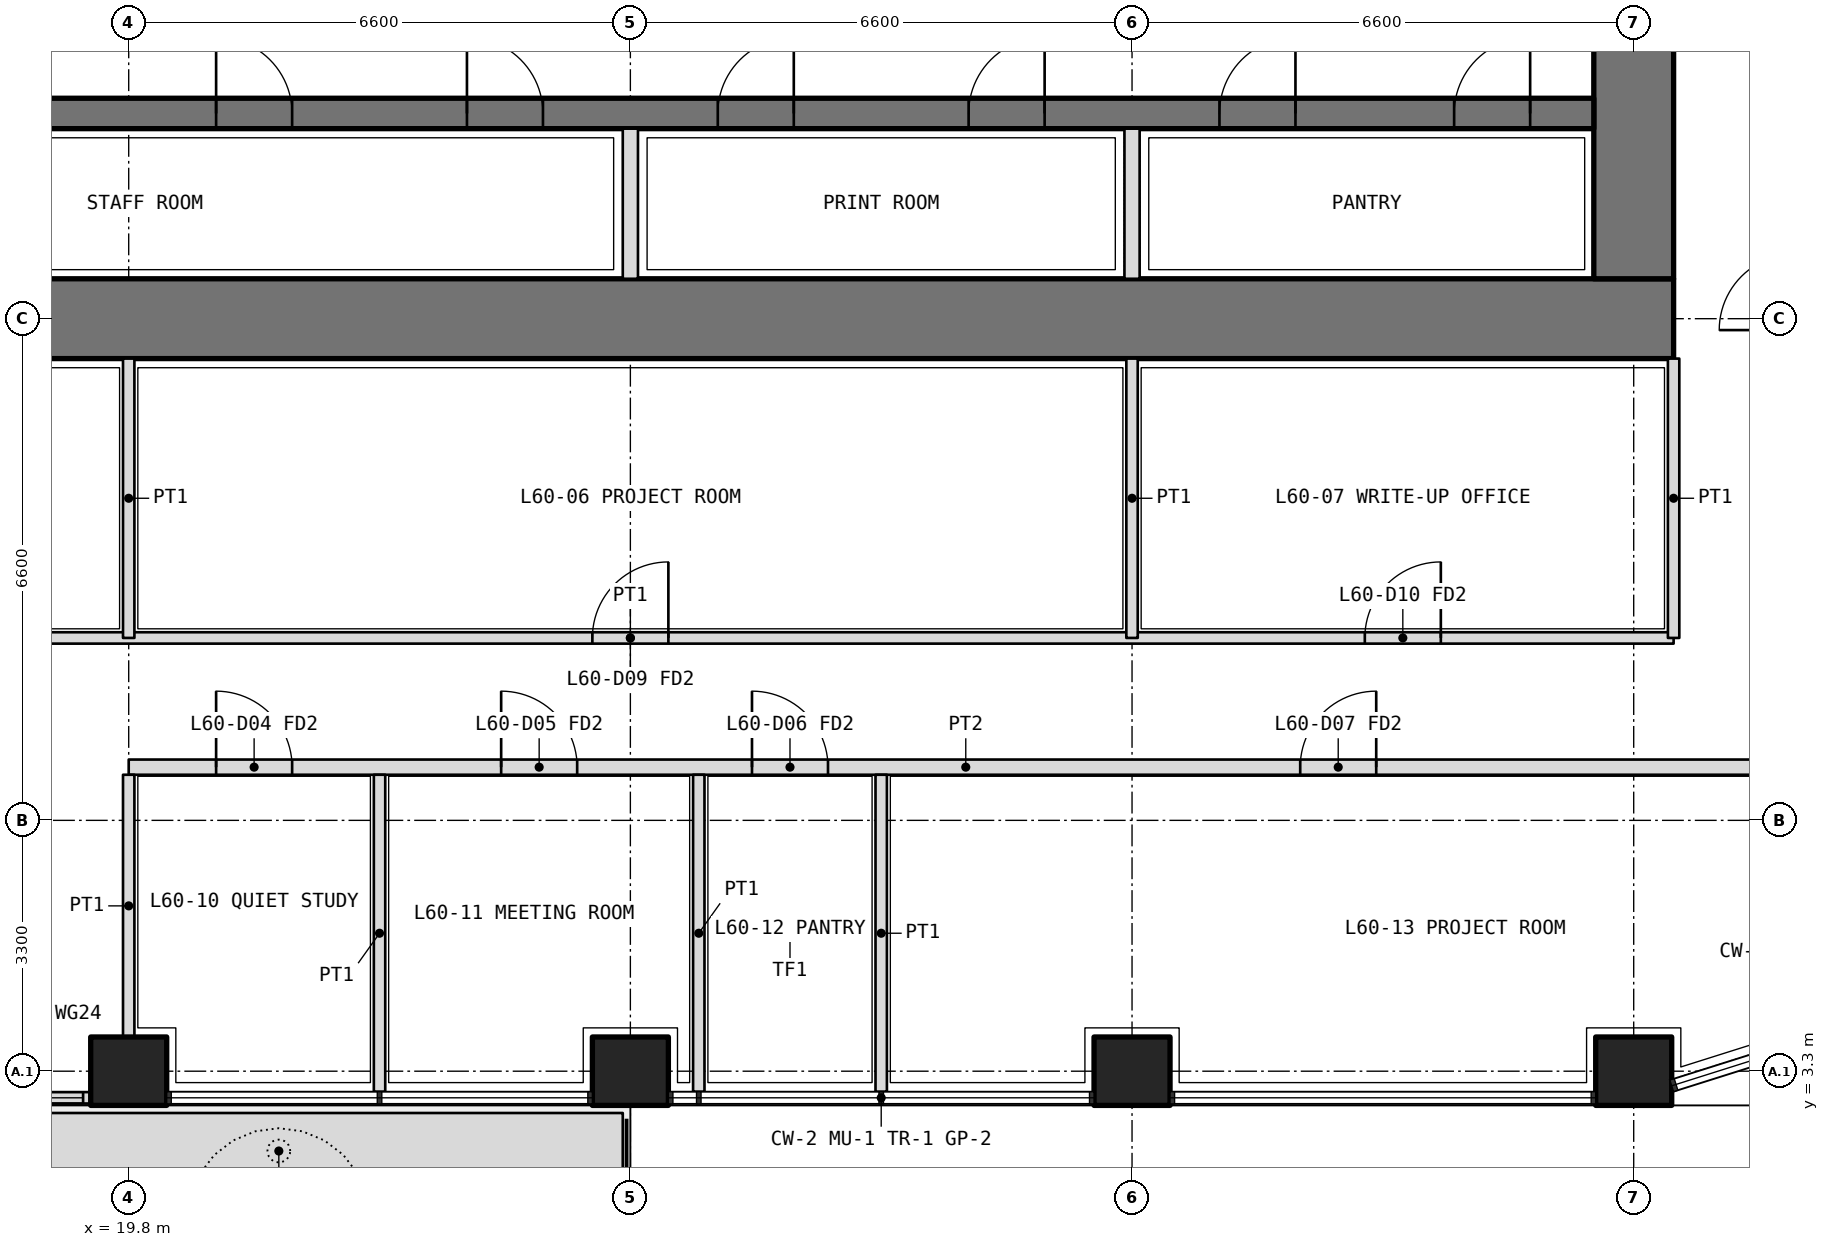
"""IFC4 building model, lengths in metres.
Left out: names, types, materials, properties, quantities, classifications, styles, units other than length and angle.
Written with IfcOpenShell. Run it as: python <this file> out.ifc"""

import sys

from ifc_helpers import new_model, si_unit, direction, frame, frame_2d, origin, origin_2d, place, context, subcontext, project, spatial, polyline, rectangle, outline, extrude, element, fill, save


model = new_model("IFC4")
c1 = context("Model", 3, precision=1e-05, world=origin(), true_north=direction((0.0, 1.0)))
c2 = subcontext(c1, "Body", "Model", "MODEL_VIEW")
j1 = project(units=[si_unit("LENGTHUNIT", "METRE"), si_unit("PLANEANGLEUNIT", "RADIAN")], contexts=[c1])
p1 = place(None, origin())
s1 = spatial("IfcSite", under=j1, at=p1, CompositionType="ELEMENT")
p2 = place(p1, origin())
s2 = spatial("IfcBuilding", under=s1, at=p2, CompositionType="ELEMENT")
p3 = place(p2, frame((0.0, 0.0, 262.8)))
s3 = spatial("IfcBuildingStorey", under=s2, at=p3, CompositionType="ELEMENT", Elevation=262.8)
for number, where, z_axis, x_axis in (
    (1, (19.8, 3.3, 0.0), (0.0, 0.0, 1.0), (1.0, 0.0, 0.0)),
    (2, (26.4, 3.3, 0.0), (0.0, 0.0, 1.0), (1.0, 0.0, 0.0)),
    (3, (33.0, 3.3, 0.0), (0.0, 0.0, 1.0), (1.0, 0.0, 0.0)),
    (4, (39.6, 3.3, 0.0), (0.0, 0.0, 1.0), (1.0, 0.0, 0.0)),
):
    element("IfcColumn", number, at=place(p3, frame(where, z_axis=z_axis, x_axis=x_axis)), inside=s3, PredefinedType="COLUMN", context=c2, shape_type="SweptSolid", body=[
        extrude(rectangle(XDim=1.0, YDim=0.9, at=origin_2d()), origin(), (0.0, 0.0, 1.0), 4.2),
    ])
p4 = place(p3, origin())
e5 = element("IfcWall", 5, at=p4, inside=s3, PredefinedType="USERDEFINED", context=c2, shape_type="SweptSolid", body=[
    extrude(outline(polyline([(17.25, 1.75), (26.3, 1.75), (26.3, 2.75), (17.25, 2.75), (17.25, 1.75)]), holes=[polyline([(17.4, 1.9), (26.15, 1.9), (26.15, 2.6), (17.4, 2.6), (17.4, 1.9)])]), origin(), (0.0, 0.0, 1.0), 1.05),
])
p5 = place(p3, frame((13.7, 2.95, 0.0), z_axis=(0.0, 0.0, 1.0), x_axis=(1.0, 0.0, 0.0)))
e6 = element("IfcWall", 6, at=p5, inside=s3, PredefinedType="SOLIDWALL", context=c2, shape_type="SweptSolid", body=[
    extrude(rectangle(XDim=5.6, YDim=0.15, at=frame_2d((2.8, 0.0))), origin(), (0.0, 0.0, 1.0), 2.7),
])
p6 = place(p5, frame((3.05, 0.0, 0.0)))
e7 = element("IfcOpeningElement", 7, at=p6, cuts=e6, PredefinedType="OPENING", context=c2, shape_type="SweptSolid", body=[
    extrude(rectangle(XDim=1.0, YDim=2.4, at=frame_2d((0.5, 1.2))), frame((0.0, 0.085, 0.0), z_axis=(0.0, -1.0, 0.0), x_axis=(1.0, 0.0, 0.0)), (0.0, 0.0, 1.0), 0.17),
])
p7 = place(p5, frame((0.1, 0.0, 0.1)))
e8 = element("IfcOpeningElement", 8, at=p7, cuts=e6, PredefinedType="OPENING", context=c2, shape_type="SweptSolid", body=[
    extrude(rectangle(XDim=2.45, YDim=2.3, at=frame_2d((1.225, 1.15))), frame((0.0, 0.085, 0.0), z_axis=(0.0, -1.0, 0.0), x_axis=(1.0, 0.0, 0.0)), (0.0, 0.0, 1.0), 0.17),
])
p8 = place(p5, frame((4.15, 0.0, 0.1)))
e9 = element("IfcOpeningElement", 9, at=p8, cuts=e6, PredefinedType="OPENING", context=c2, shape_type="SweptSolid", body=[
    extrude(rectangle(XDim=1.35, YDim=2.3, at=frame_2d((0.675, 1.15))), frame((0.0, 0.085, 0.0), z_axis=(0.0, -1.0, 0.0), x_axis=(1.0, 0.0, 0.0)), (0.0, 0.0, 1.0), 0.17),
])
p9 = place(p3, frame((12.675, 13.2, 0.0), z_axis=(0.0, 0.0, 1.0), x_axis=(1.0, 0.0, 0.0)))
e10 = element("IfcWall", 10, at=p9, inside=s3, PredefinedType="SHEAR", context=c2, shape_type="SweptSolid", body=[
    extrude(rectangle(XDim=27.45, YDim=1.05, at=frame_2d((13.725, 0.0))), origin(), (0.0, 0.0, 1.0), 4.2),
])
p10 = place(p3, frame((39.6, 13.725, 0.0), z_axis=(0.0, 0.0, 1.0), x_axis=(0.0, 1.0, 0.0)))
e11 = element("IfcWall", 11, at=p10, inside=s3, PredefinedType="SHEAR", context=c2, shape_type="SweptSolid", body=[
    extrude(rectangle(XDim=18.75, YDim=1.05, at=frame_2d((9.375, 0.0))), origin(), (0.0, 0.0, 1.0), 4.2),
])
p11 = place(p10, frame((3.025, 0.0, 0.0)))
e12 = element("IfcOpeningElement", 12, at=p11, cuts=e11, PredefinedType="OPENING", context=c2, shape_type="SweptSolid", body=[
    extrude(rectangle(XDim=1.6, YDim=2.1, at=frame_2d((0.8, 1.05))), frame((0.0, 0.535, 0.0), z_axis=(0.0, -1.0, 0.0), x_axis=(1.0, 0.0, 0.0)), (0.0, 0.0, 1.0), 1.07),
])
p12 = place(p10, frame((13.825, 0.0, 0.0)))
e13 = element("IfcOpeningElement", 13, at=p12, cuts=e11, PredefinedType="OPENING", context=c2, shape_type="SweptSolid", body=[
    extrude(rectangle(XDim=1.6, YDim=2.1, at=frame_2d((0.8, 1.05))), frame((0.0, 0.535, 0.0), z_axis=(0.0, -1.0, 0.0), x_axis=(1.0, 0.0, 0.0)), (0.0, 0.0, 1.0), 1.07),
])
p13 = place(p3, frame((13.725, 15.9, 0.0), z_axis=(0.0, 0.0, 1.0), x_axis=(1.0, 0.0, 0.0)))
e14 = element("IfcWall", 14, at=p13, inside=s3, PredefinedType="SHEAR", context=c2, shape_type="SweptSolid", body=[
    extrude(rectangle(XDim=25.35, YDim=0.4, at=frame_2d((12.675, 0.0))), origin(), (0.0, 0.0, 1.0), 4.2),
])
p14 = place(p13, frame((0.837, 0.0, 0.0)))
e15 = element("IfcOpeningElement", 15, at=p14, cuts=e14, PredefinedType="OPENING", context=c2, shape_type="SweptSolid", body=[
    extrude(rectangle(XDim=1.0, YDim=2.1, at=frame_2d((0.5, 1.05))), frame((0.0, 0.21, 0.0), z_axis=(0.0, -1.0, 0.0), x_axis=(1.0, 0.0, 0.0)), (0.0, 0.0, 1.0), 0.42),
])
p15 = place(p13, frame((3.925, 0.0, 0.0)))
e16 = element("IfcOpeningElement", 16, at=p15, cuts=e14, PredefinedType="OPENING", context=c2, shape_type="SweptSolid", body=[
    extrude(rectangle(XDim=1.0, YDim=2.1, at=frame_2d((0.5, 1.05))), frame((0.0, 0.21, 0.0), z_axis=(0.0, -1.0, 0.0), x_axis=(1.0, 0.0, 0.0)), (0.0, 0.0, 1.0), 0.42),
])
p16 = place(p13, frame((7.225, 0.0, 0.0)))
e17 = element("IfcOpeningElement", 17, at=p16, cuts=e14, PredefinedType="OPENING", context=c2, shape_type="SweptSolid", body=[
    extrude(rectangle(XDim=1.0, YDim=2.1, at=frame_2d((0.5, 1.05))), frame((0.0, 0.21, 0.0), z_axis=(0.0, -1.0, 0.0), x_axis=(1.0, 0.0, 0.0)), (0.0, 0.0, 1.0), 0.42),
])
p17 = place(p13, frame((10.525, 0.0, 0.0)))
e18 = element("IfcOpeningElement", 18, at=p17, cuts=e14, PredefinedType="OPENING", context=c2, shape_type="SweptSolid", body=[
    extrude(rectangle(XDim=1.0, YDim=2.1, at=frame_2d((0.5, 1.05))), frame((0.0, 0.21, 0.0), z_axis=(0.0, -1.0, 0.0), x_axis=(1.0, 0.0, 0.0)), (0.0, 0.0, 1.0), 0.42),
])
p18 = place(p13, frame((13.825, 0.0, 0.0)))
e19 = element("IfcOpeningElement", 19, at=p18, cuts=e14, PredefinedType="OPENING", context=c2, shape_type="SweptSolid", body=[
    extrude(rectangle(XDim=1.0, YDim=2.1, at=frame_2d((0.5, 1.05))), frame((0.0, 0.21, 0.0), z_axis=(0.0, -1.0, 0.0), x_axis=(1.0, 0.0, 0.0)), (0.0, 0.0, 1.0), 0.42),
])
p19 = place(p13, frame((17.125, 0.0, 0.0)))
e20 = element("IfcOpeningElement", 20, at=p19, cuts=e14, PredefinedType="OPENING", context=c2, shape_type="SweptSolid", body=[
    extrude(rectangle(XDim=1.0, YDim=2.1, at=frame_2d((0.5, 1.05))), frame((0.0, 0.21, 0.0), z_axis=(0.0, -1.0, 0.0), x_axis=(1.0, 0.0, 0.0)), (0.0, 0.0, 1.0), 0.42),
])
p20 = place(p13, frame((20.425, 0.0, 0.0)))
e21 = element("IfcOpeningElement", 21, at=p20, cuts=e14, PredefinedType="OPENING", context=c2, shape_type="SweptSolid", body=[
    extrude(rectangle(XDim=1.0, YDim=2.1, at=frame_2d((0.5, 1.05))), frame((0.0, 0.21, 0.0), z_axis=(0.0, -1.0, 0.0), x_axis=(1.0, 0.0, 0.0)), (0.0, 0.0, 1.0), 0.42),
])
p21 = place(p13, frame((23.512, 0.0, 0.0)))
e22 = element("IfcOpeningElement", 22, at=p21, cuts=e14, PredefinedType="OPENING", context=c2, shape_type="SweptSolid", body=[
    extrude(rectangle(XDim=1.0, YDim=2.1, at=frame_2d((0.5, 1.05))), frame((0.0, 0.21, 0.0), z_axis=(0.0, -1.0, 0.0), x_axis=(1.0, 0.0, 0.0)), (0.0, 0.0, 1.0), 0.42),
])
for number, where, z_axis, x_axis in (
    (23, (26.4, 13.725, 0.0), (0.0, 0.0, 1.0), (0.0, 1.0, 0.0)),
    (24, (33.0, 13.725, 0.0), (0.0, 0.0, 1.0), (0.0, 1.0, 0.0)),
):
    element("IfcWall", number, at=place(p3, frame(where, z_axis=z_axis, x_axis=x_axis)), inside=s3, PredefinedType="PARTITIONING", context=c2, shape_type="SweptSolid", body=[
        extrude(rectangle(XDim=1.975, YDim=0.2, at=frame_2d((0.987, 0.0))), origin(), (0.0, 0.0, 1.0), 4.2),
    ])
p22 = place(p3, frame((12.675, 9.0, 0.0), z_axis=(0.0, 0.0, 1.0), x_axis=(1.0, 0.0, 0.0)))
e25 = element("IfcWall", 25, at=p22, inside=s3, PredefinedType="PARTITIONING", context=c2, shape_type="SweptSolid", body=[
    extrude(rectangle(XDim=27.45, YDim=0.15, at=frame_2d((13.725, 0.0))), origin(), (0.0, 0.0, 1.0), 3.0),
])
p23 = place(p22, frame((3.062, 0.0, 0.0)))
e26 = element("IfcOpeningElement", 26, at=p23, cuts=e25, PredefinedType="OPENING", context=c2, shape_type="SweptSolid", body=[
    extrude(rectangle(XDim=1.0, YDim=2.1, at=frame_2d((0.5, 1.05))), frame((0.0, 0.085, 0.0), z_axis=(0.0, -1.0, 0.0), x_axis=(1.0, 0.0, 0.0)), (0.0, 0.0, 1.0), 0.17),
])
p24 = place(p22, frame((13.225, 0.0, 0.0)))
e27 = element("IfcOpeningElement", 27, at=p24, cuts=e25, PredefinedType="OPENING", context=c2, shape_type="SweptSolid", body=[
    extrude(rectangle(XDim=1.0, YDim=2.1, at=frame_2d((0.5, 1.05))), frame((0.0, 0.085, 0.0), z_axis=(0.0, -1.0, 0.0), x_axis=(1.0, 0.0, 0.0)), (0.0, 0.0, 1.0), 0.17),
])
p25 = place(p22, frame((23.387, 0.0, 0.0)))
e28 = element("IfcOpeningElement", 28, at=p25, cuts=e25, PredefinedType="OPENING", context=c2, shape_type="SweptSolid", body=[
    extrude(rectangle(XDim=1.0, YDim=2.1, at=frame_2d((0.5, 1.05))), frame((0.0, 0.085, 0.0), z_axis=(0.0, -1.0, 0.0), x_axis=(1.0, 0.0, 0.0)), (0.0, 0.0, 1.0), 0.17),
])
for number, where, z_axis, x_axis in (
    (29, (40.125, 12.675, 0.0), (0.0, 0.0, 1.0), (0.0, -1.0, 0.0)),
    (30, (19.8, 12.675, 0.0), (0.0, 0.0, 1.0), (0.0, -1.0, 0.0)),
    (31, (33.0, 12.675, 0.0), (0.0, 0.0, 1.0), (0.0, -1.0, 0.0)),
):
    element("IfcWall", number, at=place(p3, frame(where, z_axis=z_axis, x_axis=x_axis)), inside=s3, PredefinedType="PARTITIONING", context=c2, shape_type="SweptSolid", body=[
        extrude(rectangle(XDim=3.675, YDim=0.15, at=frame_2d((1.837, 0.0))), origin(), (0.0, 0.0, 1.0), 3.0),
    ])
p26 = place(p3, frame((19.8, 7.3, 0.0), z_axis=(0.0, 0.0, 1.0), x_axis=(1.0, 0.0, 0.0)))
e32 = element("IfcWall", 32, at=p26, inside=s3, PredefinedType="PARTITIONING", context=c2, shape_type="SweptSolid", body=[
    extrude(rectangle(XDim=22.025, YDim=0.2, at=frame_2d((11.012, 0.0))), origin(), (0.0, 0.0, 1.0), 3.0),
])
p27 = place(p26, frame((1.15, 0.0, 0.0)))
e33 = element("IfcOpeningElement", 33, at=p27, cuts=e32, PredefinedType="OPENING", context=c2, shape_type="SweptSolid", body=[
    extrude(rectangle(XDim=1.0, YDim=2.1, at=frame_2d((0.5, 1.05))), frame((0.0, 0.11, 0.0), z_axis=(0.0, -1.0, 0.0), x_axis=(1.0, 0.0, 0.0)), (0.0, 0.0, 1.0), 0.22),
])
p28 = place(p26, frame((4.9, 0.0, 0.0)))
e34 = element("IfcOpeningElement", 34, at=p28, cuts=e32, PredefinedType="OPENING", context=c2, shape_type="SweptSolid", body=[
    extrude(rectangle(XDim=1.0, YDim=2.1, at=frame_2d((0.5, 1.05))), frame((0.0, 0.11, 0.0), z_axis=(0.0, -1.0, 0.0), x_axis=(1.0, 0.0, 0.0)), (0.0, 0.0, 1.0), 0.22),
])
p29 = place(p26, frame((8.2, 0.0, 0.0)))
e35 = element("IfcOpeningElement", 35, at=p29, cuts=e32, PredefinedType="OPENING", context=c2, shape_type="SweptSolid", body=[
    extrude(rectangle(XDim=1.0, YDim=2.1, at=frame_2d((0.5, 1.05))), frame((0.0, 0.11, 0.0), z_axis=(0.0, -1.0, 0.0), x_axis=(1.0, 0.0, 0.0)), (0.0, 0.0, 1.0), 0.22),
])
p30 = place(p26, frame((15.413, 0.0, 0.0)))
e36 = element("IfcOpeningElement", 36, at=p30, cuts=e32, PredefinedType="OPENING", context=c2, shape_type="SweptSolid", body=[
    extrude(rectangle(XDim=1.0, YDim=2.1, at=frame_2d((0.5, 1.05))), frame((0.0, 0.11, 0.0), z_axis=(0.0, -1.0, 0.0), x_axis=(1.0, 0.0, 0.0)), (0.0, 0.0, 1.0), 0.22),
])
for number, where, z_axis, x_axis in (
    (37, (27.3, 3.03, 0.0), (0.0, 0.0, 1.0), (0.0, 1.0, 0.0)),
    (38, (29.7, 3.03, 0.0), (0.0, 0.0, 1.0), (0.0, 1.0, 0.0)),
):
    element("IfcWall", number, at=place(p3, frame(where, z_axis=z_axis, x_axis=x_axis)), inside=s3, PredefinedType="PARTITIONING", context=c2, shape_type="SweptSolid", body=[
        extrude(rectangle(XDim=4.17, YDim=0.15, at=frame_2d((2.085, 0.0))), origin(), (0.0, 0.0, 1.0), 2.7),
    ])
p31 = place(p3, frame((19.8, 3.75, 0.0), z_axis=(0.0, 0.0, 1.0), x_axis=(0.0, 1.0, 0.0)))
e39 = element("IfcWall", 39, at=p31, inside=s3, PredefinedType="PARTITIONING", context=c2, shape_type="SweptSolid", body=[
    extrude(rectangle(XDim=3.45, YDim=0.15, at=frame_2d((1.725, 0.0))), origin(), (0.0, 0.0, 1.0), 3.0),
])
p32 = place(p3, frame((23.1, 3.03, 0.0), z_axis=(0.0, 0.0, 1.0), x_axis=(0.0, 1.0, 0.0)))
e40 = element("IfcWall", 40, at=p32, inside=s3, PredefinedType="PARTITIONING", context=c2, shape_type="SweptSolid", body=[
    extrude(rectangle(XDim=4.17, YDim=0.15, at=frame_2d((2.085, 0.0))), origin(), (0.0, 0.0, 1.0), 2.7),
])
p33 = place(p8, origin())
e41 = element("IfcWindow", 41, at=p33, inside=s3, PartitioningType="SINGLE_PANEL", PredefinedType="WINDOW", context=c2, shape_type="SweptSolid", body=[
    extrude(rectangle(XDim=1.35, YDim=2.3, at=frame_2d((0.675, 1.15))), frame((0.0, 0.03, 0.0), z_axis=(0.0, -1.0, 0.0), x_axis=(1.0, 0.0, 0.0)), (0.0, 0.0, 1.0), 0.06),
])
fill(e9, e41)
p34 = place(p24, origin())
e42 = element("IfcDoor", 42, at=p34, inside=s3, OperationType="SINGLE_SWING_RIGHT", PredefinedType="DOOR", context=c2, shape_type="SweptSolid", body=[
    extrude(rectangle(XDim=1.0, YDim=2.1, at=frame_2d((0.5, 1.05))), frame((0.0, 0.025, 0.0), z_axis=(0.0, -1.0, 0.0), x_axis=(1.0, 0.0, 0.0)), (0.0, 0.0, 1.0), 0.05),
])
fill(e27, e42)
p35 = place(p25, origin())
e43 = element("IfcDoor", 43, at=p35, inside=s3, OperationType="SINGLE_SWING_RIGHT", PredefinedType="DOOR", context=c2, shape_type="SweptSolid", body=[
    extrude(rectangle(XDim=1.0, YDim=2.1, at=frame_2d((0.5, 1.05))), frame((0.0, 0.025, 0.0), z_axis=(0.0, -1.0, 0.0), x_axis=(1.0, 0.0, 0.0)), (0.0, 0.0, 1.0), 0.05),
])
fill(e28, e43)
p36 = place(p27, origin())
e44 = element("IfcDoor", 44, at=p36, inside=s3, OperationType="SINGLE_SWING_LEFT", PredefinedType="DOOR", context=c2, shape_type="SweptSolid", body=[
    extrude(rectangle(XDim=1.0, YDim=2.1, at=frame_2d((0.5, 1.05))), frame((0.0, 0.025, 0.0), z_axis=(0.0, -1.0, 0.0), x_axis=(1.0, 0.0, 0.0)), (0.0, 0.0, 1.0), 0.05),
])
fill(e33, e44)
p37 = place(p28, origin())
e45 = element("IfcDoor", 45, at=p37, inside=s3, OperationType="SINGLE_SWING_LEFT", PredefinedType="DOOR", context=c2, shape_type="SweptSolid", body=[
    extrude(rectangle(XDim=1.0, YDim=2.1, at=frame_2d((0.5, 1.05))), frame((0.0, 0.025, 0.0), z_axis=(0.0, -1.0, 0.0), x_axis=(1.0, 0.0, 0.0)), (0.0, 0.0, 1.0), 0.05),
])
fill(e34, e45)
p38 = place(p29, origin())
e46 = element("IfcDoor", 46, at=p38, inside=s3, OperationType="SINGLE_SWING_LEFT", PredefinedType="DOOR", context=c2, shape_type="SweptSolid", body=[
    extrude(rectangle(XDim=1.0, YDim=2.1, at=frame_2d((0.5, 1.05))), frame((0.0, 0.025, 0.0), z_axis=(0.0, -1.0, 0.0), x_axis=(1.0, 0.0, 0.0)), (0.0, 0.0, 1.0), 0.05),
])
fill(e35, e46)
p39 = place(p30, origin())
e47 = element("IfcDoor", 47, at=p39, inside=s3, OperationType="SINGLE_SWING_RIGHT", PredefinedType="DOOR", context=c2, shape_type="SweptSolid", body=[
    extrude(rectangle(XDim=1.0, YDim=2.1, at=frame_2d((0.5, 1.05))), frame((0.0, 0.025, 0.0), z_axis=(0.0, -1.0, 0.0), x_axis=(1.0, 0.0, 0.0)), (0.0, 0.0, 1.0), 0.05),
])
fill(e36, e47)
p40 = place(p16, origin())
e48 = element("IfcDoor", 48, at=p40, inside=s3, OperationType="SINGLE_SWING_LEFT", PredefinedType="DOOR", context=c2, shape_type="SweptSolid", body=[
    extrude(rectangle(XDim=1.0, YDim=2.1, at=frame_2d((0.5, 1.05))), frame((0.0, 0.025, 0.0), z_axis=(0.0, -1.0, 0.0), x_axis=(1.0, 0.0, 0.0)), (0.0, 0.0, 1.0), 0.05),
])
fill(e17, e48)
p41 = place(p17, origin())
e49 = element("IfcDoor", 49, at=p41, inside=s3, OperationType="SINGLE_SWING_LEFT", PredefinedType="DOOR", context=c2, shape_type="SweptSolid", body=[
    extrude(rectangle(XDim=1.0, YDim=2.1, at=frame_2d((0.5, 1.05))), frame((0.0, 0.025, 0.0), z_axis=(0.0, -1.0, 0.0), x_axis=(1.0, 0.0, 0.0)), (0.0, 0.0, 1.0), 0.05),
])
fill(e18, e49)
p42 = place(p18, origin())
e50 = element("IfcDoor", 50, at=p42, inside=s3, OperationType="SINGLE_SWING_RIGHT", PredefinedType="DOOR", context=c2, shape_type="SweptSolid", body=[
    extrude(rectangle(XDim=1.0, YDim=2.1, at=frame_2d((0.5, 1.05))), frame((0.0, 0.025, 0.0), z_axis=(0.0, -1.0, 0.0), x_axis=(1.0, 0.0, 0.0)), (0.0, 0.0, 1.0), 0.05),
])
fill(e19, e50)
p43 = place(p19, origin())
e51 = element("IfcDoor", 51, at=p43, inside=s3, OperationType="SINGLE_SWING_RIGHT", PredefinedType="DOOR", context=c2, shape_type="SweptSolid", body=[
    extrude(rectangle(XDim=1.0, YDim=2.1, at=frame_2d((0.5, 1.05))), frame((0.0, 0.025, 0.0), z_axis=(0.0, -1.0, 0.0), x_axis=(1.0, 0.0, 0.0)), (0.0, 0.0, 1.0), 0.05),
])
fill(e20, e51)
p44 = place(p20, origin())
e52 = element("IfcDoor", 52, at=p44, inside=s3, OperationType="SINGLE_SWING_RIGHT", PredefinedType="DOOR", context=c2, shape_type="SweptSolid", body=[
    extrude(rectangle(XDim=1.0, YDim=2.1, at=frame_2d((0.5, 1.05))), frame((0.0, 0.025, 0.0), z_axis=(0.0, -1.0, 0.0), x_axis=(1.0, 0.0, 0.0)), (0.0, 0.0, 1.0), 0.05),
])
fill(e21, e52)
p45 = place(p21, origin())
e53 = element("IfcDoor", 53, at=p45, inside=s3, OperationType="SINGLE_SWING_RIGHT", PredefinedType="DOOR", context=c2, shape_type="SweptSolid", body=[
    extrude(rectangle(XDim=1.0, YDim=2.1, at=frame_2d((0.5, 1.05))), frame((0.0, 0.025, 0.0), z_axis=(0.0, -1.0, 0.0), x_axis=(1.0, 0.0, 0.0)), (0.0, 0.0, 1.0), 0.05),
])
fill(e22, e53)
save(model, sys.argv[1])
